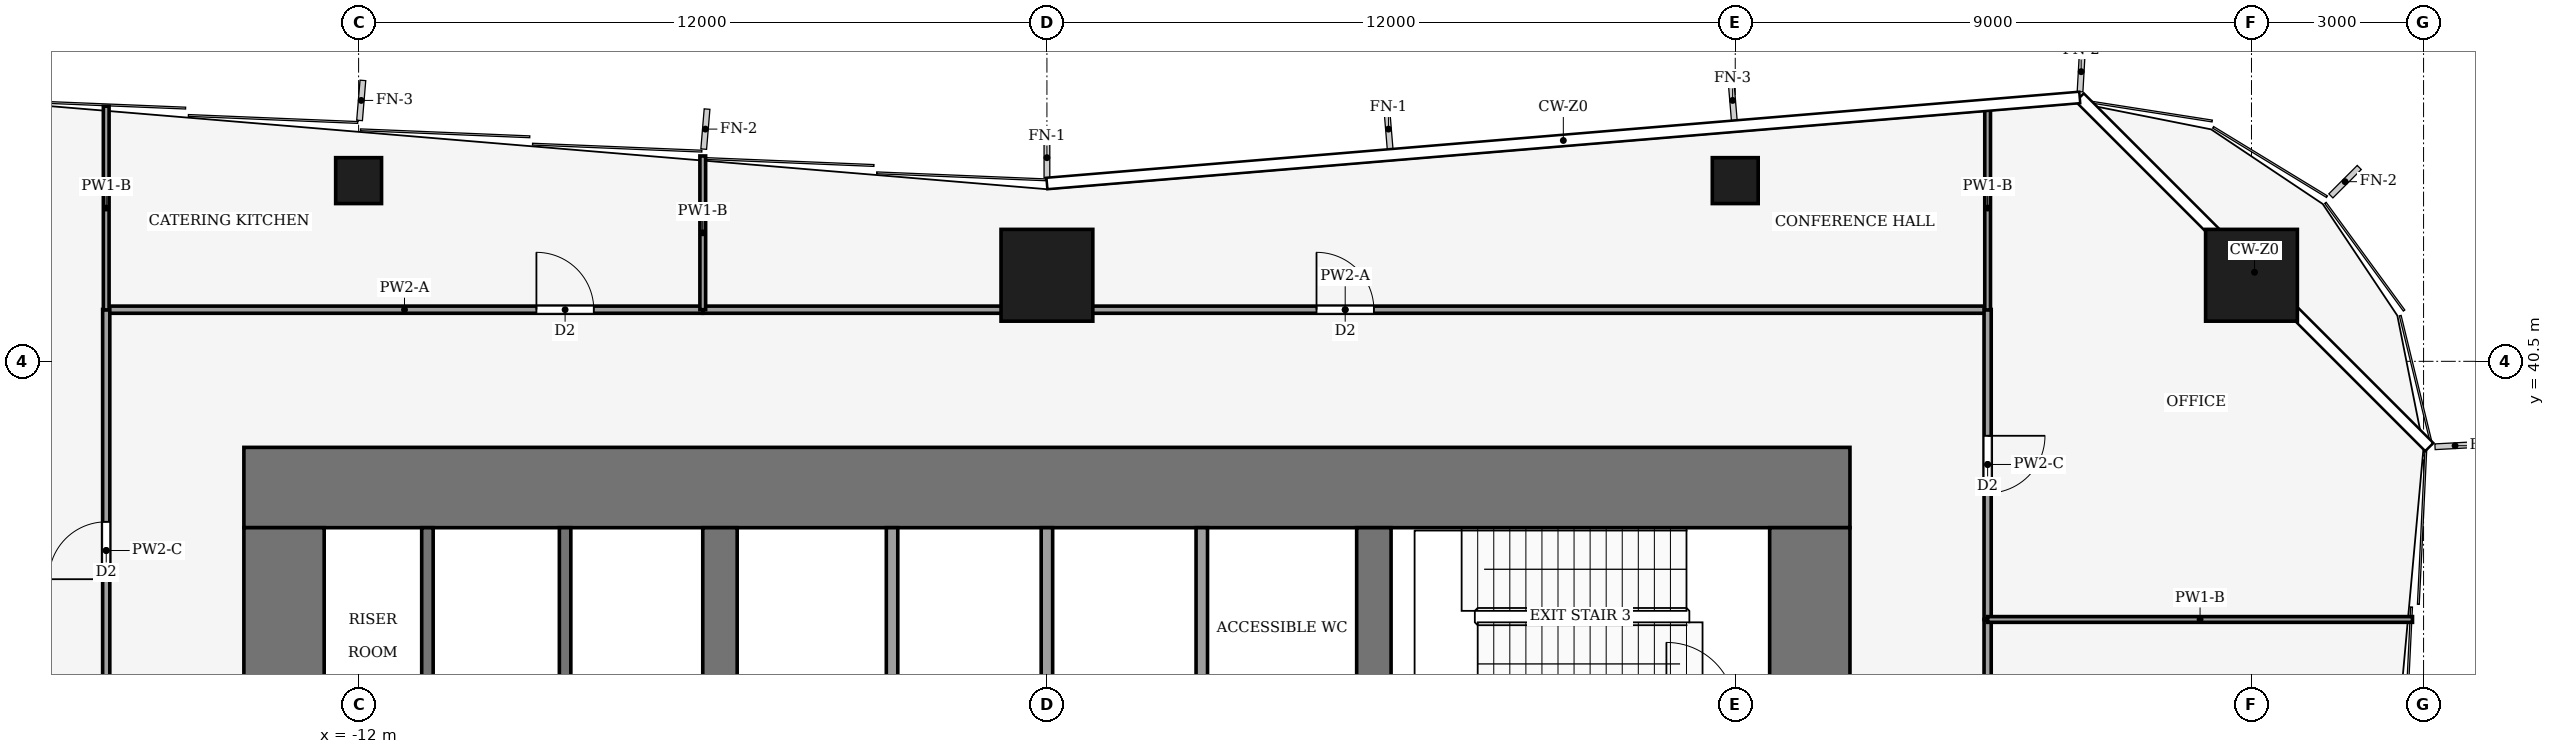
"""IFC4 building model, lengths in metres.
Left out: names, types, materials, properties, quantities, classifications, styles, units other than length and angle.
Written with IfcOpenShell. Run it as: python <this file> out.ifc"""

import sys

from ifc_helpers import new_model, si_unit, direction, frame, frame_2d, origin, origin_2d, place, context, subcontext, project, spatial, rectangle, hollow_rectangle, extrude, element, fill, save


model = new_model("IFC4")
c1 = context("Model", 3, precision=1e-05, world=origin(), true_north=direction((0.0, 1.0)))
c2 = subcontext(c1, "Body", "Model", "MODEL_VIEW")
j1 = project(units=[si_unit("LENGTHUNIT", "METRE"), si_unit("PLANEANGLEUNIT", "RADIAN")], contexts=[c1])
p1 = place(None, origin())
s1 = spatial("IfcSite", under=j1, at=p1, CompositionType="ELEMENT")
p2 = place(p1, origin())
s2 = spatial("IfcBuilding", under=s1, at=p2, CompositionType="ELEMENT")
p3 = place(p2, frame((0.0, 0.0, 9.0)))
s3 = spatial("IfcBuildingStorey", under=s2, at=p3, CompositionType="ELEMENT", Elevation=9.0)
p4 = place(p3, frame((-14.0, 38.3, -0.13), z_axis=(0.0, 0.0, 1.0), x_axis=(1.0, 0.0, 0.0)))
e1 = element("IfcWall", 1, at=p4, inside=s3, PredefinedType="SHEAR", context=c2, shape_type="SweptSolid", body=[
    extrude(rectangle(XDim=28.0, YDim=1.4, at=frame_2d((14.0, 0.0))), origin(), (0.0, 0.0, 1.0), 5.0),
])
p5 = place(p3, frame((-13.3, 18.4, -0.13), z_axis=(0.0, 0.0, 1.0), x_axis=(0.0, 1.0, 0.0)))
e2 = element("IfcWall", 2, at=p5, inside=s3, PredefinedType="SHEAR", context=c2, shape_type="SweptSolid", body=[
    extrude(rectangle(XDim=19.2, YDim=1.4, at=frame_2d((9.6, 0.0))), origin(), (0.0, 0.0, 1.0), 5.0),
])
p6 = place(p5, frame((2.8, 0.0, 0.13)))
e3 = element("IfcOpeningElement", 3, at=p6, cuts=e2, PredefinedType="OPENING", context=c2, shape_type="SweptSolid", body=[
    extrude(rectangle(XDim=2.4, YDim=2.4, at=frame_2d((1.2, 1.2))), frame((0.0, 0.71, 0.0), z_axis=(0.0, -1.0, 0.0), x_axis=(1.0, 0.0, 0.0)), (0.0, 0.0, 1.0), 1.42),
])
p7 = place(p5, frame((13.4, 0.0, 0.13)))
e4 = element("IfcOpeningElement", 4, at=p7, cuts=e2, PredefinedType="OPENING", context=c2, shape_type="SweptSolid", body=[
    extrude(rectangle(XDim=1.4, YDim=2.2, at=frame_2d((0.7, 1.1))), frame((0.0, 0.71, 0.0), z_axis=(0.0, -1.0, 0.0), x_axis=(1.0, 0.0, 0.0)), (0.0, 0.0, 1.0), 1.42),
])
p8 = place(p3, frame((13.3, 18.4, -0.13), z_axis=(0.0, 0.0, 1.0), x_axis=(0.0, 1.0, 0.0)))
e5 = element("IfcWall", 5, at=p8, inside=s3, PredefinedType="SHEAR", context=c2, shape_type="SweptSolid", body=[
    extrude(rectangle(XDim=19.2, YDim=1.4, at=frame_2d((9.6, 0.0))), origin(), (0.0, 0.0, 1.0), 5.0),
])
p9 = place(p8, frame((2.8, 0.0, 0.13)))
e6 = element("IfcOpeningElement", 6, at=p9, cuts=e5, PredefinedType="OPENING", context=c2, shape_type="SweptSolid", body=[
    extrude(rectangle(XDim=2.4, YDim=2.4, at=frame_2d((1.2, 1.2))), frame((0.0, 0.71, 0.0), z_axis=(0.0, -1.0, 0.0), x_axis=(1.0, 0.0, 0.0)), (0.0, 0.0, 1.0), 1.42),
])
p10 = place(p8, frame((13.3, 0.0, 0.13)))
e7 = element("IfcOpeningElement", 7, at=p10, cuts=e5, PredefinedType="OPENING", context=c2, shape_type="SweptSolid", body=[
    extrude(rectangle(XDim=2.4, YDim=2.4, at=frame_2d((1.2, 1.2))), frame((0.0, 0.71, 0.0), z_axis=(0.0, -1.0, 0.0), x_axis=(1.0, 0.0, 0.0)), (0.0, 0.0, 1.0), 1.42),
])
p11 = place(p3, frame((-5.7, 18.4, -0.13), z_axis=(0.0, 0.0, 1.0), x_axis=(0.0, 1.0, 0.0)))
e8 = element("IfcWall", 8, at=p11, inside=s3, PredefinedType="SHEAR", context=c2, shape_type="SweptSolid", body=[
    extrude(rectangle(XDim=19.2, YDim=0.6, at=frame_2d((9.6, 0.0))), origin(), (0.0, 0.0, 1.0), 5.0),
])
p12 = place(p11, frame((8.35, 0.0, 0.13)))
e9 = element("IfcOpeningElement", 9, at=p12, cuts=e8, PredefinedType="OPENING", context=c2, shape_type="SweptSolid", body=[
    extrude(rectangle(XDim=0.9, YDim=2.1, at=frame_2d((0.45, 1.05))), frame((0.0, 0.31, 0.0), z_axis=(0.0, -1.0, 0.0), x_axis=(1.0, 0.0, 0.0)), (0.0, 0.0, 1.0), 0.62),
])
p13 = place(p3, frame((5.7, 18.4, -0.13), z_axis=(0.0, 0.0, 1.0), x_axis=(0.0, 1.0, 0.0)))
e10 = element("IfcWall", 10, at=p13, inside=s3, PredefinedType="SHEAR", context=c2, shape_type="SweptSolid", body=[
    extrude(rectangle(XDim=19.2, YDim=0.6, at=frame_2d((9.6, 0.0))), origin(), (0.0, 0.0, 1.0), 5.0),
])
p14 = place(p13, frame((13.3, 0.0, 0.13)))
e11 = element("IfcOpeningElement", 11, at=p14, cuts=e10, PredefinedType="OPENING", context=c2, shape_type="SweptSolid", body=[
    extrude(rectangle(XDim=2.4, YDim=2.4, at=frame_2d((1.2, 1.2))), frame((0.0, 0.31, 0.0), z_axis=(0.0, -1.0, 0.0), x_axis=(1.0, 0.0, 0.0)), (0.0, 0.0, 1.0), 0.62),
])
for number, where, z_axis, x_axis in (
    (12, (0.0, 42.0, 0.0), (0.0, 0.0, 1.0), (1.0, 0.0, 0.0)),
    (13, (21.0, 42.0, 0.0), (0.0, 0.0, 1.0), (1.0, 0.0, 0.0)),
):
    element("IfcColumn", number, at=place(p3, frame(where, z_axis=z_axis, x_axis=x_axis)), inside=s3, PredefinedType="COLUMN", context=c2, shape_type="SweptSolid", body=[
        extrude(hollow_rectangle(XDim=1.6, YDim=1.6, WallThickness=0.09, at=origin_2d()), origin(), (0.0, 0.0, 1.0), 5.0),
    ])
for number, where, z_axis, x_axis in (
    (14, (-12.0, 43.65, 0.0), (0.0, 0.0, 1.0), (1.0, 0.0, 0.0)),
    (15, (12.0, 43.65, 0.0), (0.0, 0.0, 1.0), (1.0, 0.0, 0.0)),
):
    element("IfcColumn", number, at=place(p3, frame(where, z_axis=z_axis, x_axis=x_axis)), inside=s3, PredefinedType="COLUMN", context=c2, shape_type="SweptSolid", body=[
        extrude(hollow_rectangle(XDim=0.8, YDim=0.8, WallThickness=0.04, at=origin_2d()), origin(), (0.0, 0.0, 1.0), 5.0),
    ])
for number, where, z_axis, x_axis in (
    (16, (-10.8, 34.0, 0.0), (0.0, 0.0, 1.0), (0.0, 1.0, 0.0)),
    (17, (-8.4, 34.0, 0.0), (0.0, 0.0, 1.0), (0.0, 1.0, 0.0)),
    (18, (-2.7, 34.0, 0.0), (0.0, 0.0, 1.0), (0.0, 1.0, 0.0)),
    (19, (0.0, 34.0, 0.0), (0.0, 0.0, 1.0), (0.0, 1.0, 0.0)),
    (20, (2.7, 34.0, 0.0), (0.0, 0.0, 1.0), (0.0, 1.0, 0.0)),
):
    element("IfcWall", number, at=place(p3, frame(where, z_axis=z_axis, x_axis=x_axis)), inside=s3, PredefinedType="PARTITIONING", context=c2, shape_type="SweptSolid", body=[
        extrude(rectangle(XDim=3.6, YDim=0.2, at=frame_2d((1.8, 0.0))), origin(), (0.0, 0.0, 1.0), 4.87),
    ])
p15 = place(p3, frame((-16.4, 41.4, 0.0), z_axis=(0.0, 0.0, 1.0), x_axis=(1.0, 0.0, 0.0)))
e21 = element("IfcWall", 21, at=p15, inside=s3, PredefinedType="PARTITIONING", context=c2, shape_type="SweptSolid", body=[
    extrude(rectangle(XDim=10.4, YDim=0.125, at=frame_2d((5.2, 0.0))), origin(), (0.0, 0.0, 1.0), 4.54),
])
p16 = place(p15, frame((7.5, 0.0, 0.0)))
e22 = element("IfcOpeningElement", 22, at=p16, cuts=e21, PredefinedType="OPENING", context=c2, shape_type="SweptSolid", body=[
    extrude(rectangle(XDim=1.0, YDim=2.1, at=frame_2d((0.5, 1.05))), frame((0.0, 0.073, 0.0), z_axis=(0.0, -1.0, 0.0), x_axis=(1.0, 0.0, 0.0)), (0.0, 0.0, 1.0), 0.145),
])
p17 = place(p3, frame((-6.0, 41.4, 0.0), z_axis=(0.0, 0.0, 1.0), x_axis=(1.0, 0.0, 0.0)))
e23 = element("IfcWall", 23, at=p17, inside=s3, PredefinedType="PARTITIONING", context=c2, shape_type="SweptSolid", body=[
    extrude(rectangle(XDim=22.4, YDim=0.125, at=frame_2d((11.2, 0.0))), origin(), (0.0, 0.0, 1.0), 4.54),
])
p18 = place(p17, frame((10.7, 0.0, 0.0)))
e24 = element("IfcOpeningElement", 24, at=p18, cuts=e23, PredefinedType="OPENING", context=c2, shape_type="SweptSolid", body=[
    extrude(rectangle(XDim=1.0, YDim=2.1, at=frame_2d((0.5, 1.05))), frame((0.0, 0.073, 0.0), z_axis=(0.0, -1.0, 0.0), x_axis=(1.0, 0.0, 0.0)), (0.0, 0.0, 1.0), 0.145),
])
p19 = place(p3, frame((-16.4, 33.0, 0.0), z_axis=(0.0, 0.0, 1.0), x_axis=(0.0, 1.0, 0.0)))
e25 = element("IfcWall", 25, at=p19, inside=s3, PredefinedType="PARTITIONING", context=c2, shape_type="SweptSolid", body=[
    extrude(rectangle(XDim=8.404, YDim=0.125, at=frame_2d((4.202, 0.0))), origin(), (0.0, 0.0, 1.0), 4.14),
])
p20 = place(p19, frame((3.702, 0.0, 0.0)))
e26 = element("IfcOpeningElement", 26, at=p20, cuts=e25, PredefinedType="OPENING", context=c2, shape_type="SweptSolid", body=[
    extrude(rectangle(XDim=1.0, YDim=2.1, at=frame_2d((0.5, 1.05))), frame((0.0, 0.073, 0.0), z_axis=(0.0, -1.0, 0.0), x_axis=(1.0, 0.0, 0.0)), (0.0, 0.0, 1.0), 0.145),
])
p21 = place(p3, frame((16.4, 36.0, 0.0), z_axis=(0.0, 0.0, 1.0), x_axis=(0.0, -1.0, 0.0)))
e27 = element("IfcWall", 27, at=p21, inside=s3, PredefinedType="PARTITIONING", context=c2, shape_type="SweptSolid", body=[
    extrude(rectangle(XDim=6.0, YDim=0.125, at=frame_2d((3.0, 0.0))), origin(), (0.0, 0.0, 1.0), 4.48),
])
p22 = place(p21, frame((2.5, 0.0, 0.0)))
e28 = element("IfcOpeningElement", 28, at=p22, cuts=e27, PredefinedType="OPENING", context=c2, shape_type="SweptSolid", body=[
    extrude(rectangle(XDim=1.0, YDim=2.1, at=frame_2d((0.5, 1.05))), frame((0.0, 0.073, 0.0), z_axis=(0.0, -1.0, 0.0), x_axis=(1.0, 0.0, 0.0)), (0.0, 0.0, 1.0), 0.145),
])
p23 = place(p3, frame((16.4, 41.404, 0.0), z_axis=(0.0, 0.0, 1.0), x_axis=(0.0, -1.0, 0.0)))
e29 = element("IfcWall", 29, at=p23, inside=s3, PredefinedType="PARTITIONING", context=c2, shape_type="SweptSolid", body=[
    extrude(rectangle(XDim=5.404, YDim=0.125, at=frame_2d((2.702, 0.0))), origin(), (0.0, 0.0, 1.0), 4.14),
])
p24 = place(p23, frame((2.202, 0.0, 0.0)))
e30 = element("IfcOpeningElement", 30, at=p24, cuts=e29, PredefinedType="OPENING", context=c2, shape_type="SweptSolid", body=[
    extrude(rectangle(XDim=1.0, YDim=2.1, at=frame_2d((0.5, 1.05))), frame((0.0, 0.073, 0.0), z_axis=(0.0, -1.0, 0.0), x_axis=(1.0, 0.0, 0.0)), (0.0, 0.0, 1.0), 0.145),
])
p25 = place(p3, frame((-6.0, 41.4, 0.0), z_axis=(0.0, 0.0, 1.0), x_axis=(0.0, 1.0, 0.0)))
e31 = element("IfcWall", 31, at=p25, inside=s3, PredefinedType="PARTITIONING", context=c2, shape_type="SweptSolid", body=[
    extrude(rectangle(XDim=2.68, YDim=0.1, at=frame_2d((1.34, 0.0))), origin(), (0.0, 0.0, 1.0), 4.04),
])
for number, where, z_axis, x_axis in (
    (32, (-16.4, 44.947, 0.0), (0.0, 0.0, 1.0), (0.0, -1.0, 0.0)),
    (33, (16.4, 41.396, 0.0), (0.0, 0.0, 1.0), (0.0, 1.0, 0.0)),
):
    element("IfcWall", number, at=place(p3, frame(where, z_axis=z_axis, x_axis=x_axis)), inside=s3, PredefinedType="PARTITIONING", context=c2, shape_type="SweptSolid", body=[
        extrude(rectangle(XDim=3.551, YDim=0.1, at=frame_2d((1.775, 0.0))), origin(), (0.0, 0.0, 1.0), 4.04),
    ])
p26 = place(p3, frame((23.807, 36.0, 0.0), z_axis=(0.0, 0.0, 1.0), x_axis=(-1.0, 0.0, 0.0)))
e34 = element("IfcWall", 34, at=p26, inside=s3, PredefinedType="PARTITIONING", context=c2, shape_type="SweptSolid", body=[
    extrude(rectangle(XDim=7.407, YDim=0.1, at=frame_2d((3.704, 0.0))), origin(), (0.0, 0.0, 1.0), 4.04),
])
p27 = place(p16, origin())
e35 = element("IfcDoor", 35, at=p27, inside=s3, OperationType="SINGLE_SWING_RIGHT", PredefinedType="DOOR", context=c2, shape_type="SweptSolid", body=[
    extrude(rectangle(XDim=1.0, YDim=2.1, at=frame_2d((0.5, 1.05))), frame((0.0, 0.025, 0.0), z_axis=(0.0, -1.0, 0.0), x_axis=(1.0, 0.0, 0.0)), (0.0, 0.0, 1.0), 0.05),
])
fill(e22, e35)
p28 = place(p18, origin())
e36 = element("IfcDoor", 36, at=p28, inside=s3, OperationType="SINGLE_SWING_RIGHT", PredefinedType="DOOR", context=c2, shape_type="SweptSolid", body=[
    extrude(rectangle(XDim=1.0, YDim=2.1, at=frame_2d((0.5, 1.05))), frame((0.0, 0.025, 0.0), z_axis=(0.0, -1.0, 0.0), x_axis=(1.0, 0.0, 0.0)), (0.0, 0.0, 1.0), 0.05),
])
fill(e24, e36)
p29 = place(p20, origin())
e37 = element("IfcDoor", 37, at=p29, inside=s3, OperationType="SINGLE_SWING_LEFT", PredefinedType="DOOR", context=c2, shape_type="SweptSolid", body=[
    extrude(rectangle(XDim=1.0, YDim=2.1, at=frame_2d((0.5, 1.05))), frame((0.0, 0.025, 0.0), z_axis=(0.0, -1.0, 0.0), x_axis=(1.0, 0.0, 0.0)), (0.0, 0.0, 1.0), 0.05),
])
fill(e26, e37)
p30 = place(p24, origin())
e38 = element("IfcDoor", 38, at=p30, inside=s3, OperationType="SINGLE_SWING_LEFT", PredefinedType="DOOR", context=c2, shape_type="SweptSolid", body=[
    extrude(rectangle(XDim=1.0, YDim=2.1, at=frame_2d((0.5, 1.05))), frame((0.0, 0.025, 0.0), z_axis=(0.0, -1.0, 0.0), x_axis=(1.0, 0.0, 0.0)), (0.0, 0.0, 1.0), 0.05),
])
fill(e30, e38)
save(model, sys.argv[1])
